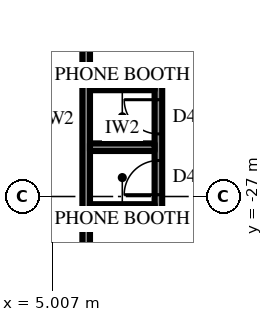
"""IFC4 building model, lengths in metres.
Left out: names, types, materials, properties, quantities, classifications, styles, units other than length and angle.
Written with IfcOpenShell. Run it as: python <this file> out.ifc"""

import sys

from ifc_helpers import new_model, si_unit, direction, frame, frame_2d, origin, place, context, subcontext, project, spatial, rectangle, extrude, element, fill, save


model = new_model("IFC4")
c1 = context("Model", 3, precision=1e-05, world=origin(), true_north=direction((0.0, 1.0)))
c2 = subcontext(c1, "Body", "Model", "MODEL_VIEW")
j1 = project(units=[si_unit("LENGTHUNIT", "METRE"), si_unit("PLANEANGLEUNIT", "RADIAN")], contexts=[c1])
p1 = place(None, origin())
s1 = spatial("IfcSite", under=j1, at=p1, CompositionType="ELEMENT")
p2 = place(p1, origin())
s2 = spatial("IfcBuilding", under=s1, at=p2, CompositionType="ELEMENT")
p3 = place(p2, frame((0.0, 0.0, 61.3)))
s3 = spatial("IfcBuildingStorey", under=s2, at=p3, CompositionType="ELEMENT", Elevation=61.3)
p4 = place(p3, frame((5.9, -17.7, 0.0), z_axis=(0.0, 0.0, 1.0), x_axis=(0.0, -1.0, 0.0)))
e1 = element("IfcWall", 1, at=p4, inside=s3, PredefinedType="PARTITIONING", context=c2, shape_type="SweptSolid", body=[
    extrude(rectangle(XDim=14.55, YDim=0.2, at=frame_2d((7.275, 0.0))), origin(), (0.0, 0.0, 1.0), 4.0),
])
p5 = place(p4, frame((0.955, 0.0, 0.0)))
e2 = element("IfcOpeningElement", 2, at=p5, cuts=e1, PredefinedType="OPENING", context=c2, shape_type="SweptSolid", body=[
    extrude(rectangle(XDim=1.0, YDim=2.2, at=frame_2d((0.5, 1.1))), frame((0.0, 0.11, 0.0), z_axis=(0.0, -1.0, 0.0), x_axis=(1.0, 0.0, 0.0)), (0.0, 0.0, 1.0), 0.22),
])
p6 = place(p3, frame((7.8, -24.002, 0.0), z_axis=(0.0, 0.0, 1.0), x_axis=(0.0, -1.0, 0.0)))
e3 = element("IfcWall", 3, at=p6, inside=s3, PredefinedType="PARTITIONING", context=c2, shape_type="SweptSolid", body=[
    extrude(rectangle(XDim=3.4, YDim=0.2, at=frame_2d((1.7, 0.0))), origin(), (0.0, 0.0, 1.0), 4.0),
])
p7 = place(p6, frame((0.45, 0.0, 0.0)))
e4 = element("IfcOpeningElement", 4, at=p7, cuts=e3, PredefinedType="OPENING", context=c2, shape_type="SweptSolid", body=[
    extrude(rectangle(XDim=0.9, YDim=2.2, at=frame_2d((0.45, 1.1))), frame((0.0, 0.11, 0.0), z_axis=(0.0, -1.0, 0.0), x_axis=(1.0, 0.0, 0.0)), (0.0, 0.0, 1.0), 0.22),
])
p8 = place(p6, frame((2.05, 0.0, 0.0)))
e5 = element("IfcOpeningElement", 5, at=p8, cuts=e3, PredefinedType="OPENING", context=c2, shape_type="SweptSolid", body=[
    extrude(rectangle(XDim=0.9, YDim=2.2, at=frame_2d((0.45, 1.1))), frame((0.0, 0.11, 0.0), z_axis=(0.0, -1.0, 0.0), x_axis=(1.0, 0.0, 0.0)), (0.0, 0.0, 1.0), 0.22),
])
for number, where, z_axis, x_axis in (
    (6, (6.0, -24.103, 0.0), (0.0, 0.0, 1.0), (1.0, 0.0, 0.0)),
    (7, (6.0, -25.702, 0.0), (0.0, 0.0, 1.0), (1.0, 0.0, 0.0)),
    (8, (6.0, -27.302, 0.0), (0.0, 0.0, 1.0), (1.0, 0.0, 0.0)),
):
    element("IfcWall", number, at=place(p3, frame(where, z_axis=z_axis, x_axis=x_axis)), inside=s3, PredefinedType="PARTITIONING", context=c2, shape_type="SweptSolid", body=[
        extrude(rectangle(XDim=1.7, YDim=0.2, at=frame_2d((0.85, 0.0))), origin(), (0.0, 0.0, 1.0), 4.0),
    ])
p9 = place(p7, frame((0.9, 0.0, 0.0), z_axis=(0.0, 0.0, 1.0), x_axis=(-1.0, 0.0, 0.0)))
e9 = element("IfcDoor", 9, at=p9, inside=s3, OperationType="SINGLE_SWING_LEFT", PredefinedType="DOOR", context=c2, shape_type="SweptSolid", body=[
    extrude(rectangle(XDim=0.9, YDim=2.2, at=frame_2d((0.45, 1.1))), frame((0.0, 0.025, 0.0), z_axis=(0.0, -1.0, 0.0), x_axis=(1.0, 0.0, 0.0)), (0.0, 0.0, 1.0), 0.05),
])
fill(e4, e9)
p10 = place(p8, frame((0.9, 0.0, 0.0), z_axis=(0.0, 0.0, 1.0), x_axis=(-1.0, 0.0, 0.0)))
e10 = element("IfcDoor", 10, at=p10, inside=s3, OperationType="SINGLE_SWING_RIGHT", PredefinedType="DOOR", context=c2, shape_type="SweptSolid", body=[
    extrude(rectangle(XDim=0.9, YDim=2.2, at=frame_2d((0.45, 1.1))), frame((0.0, 0.025, 0.0), z_axis=(0.0, -1.0, 0.0), x_axis=(1.0, 0.0, 0.0)), (0.0, 0.0, 1.0), 0.05),
])
fill(e5, e10)
save(model, sys.argv[1])
